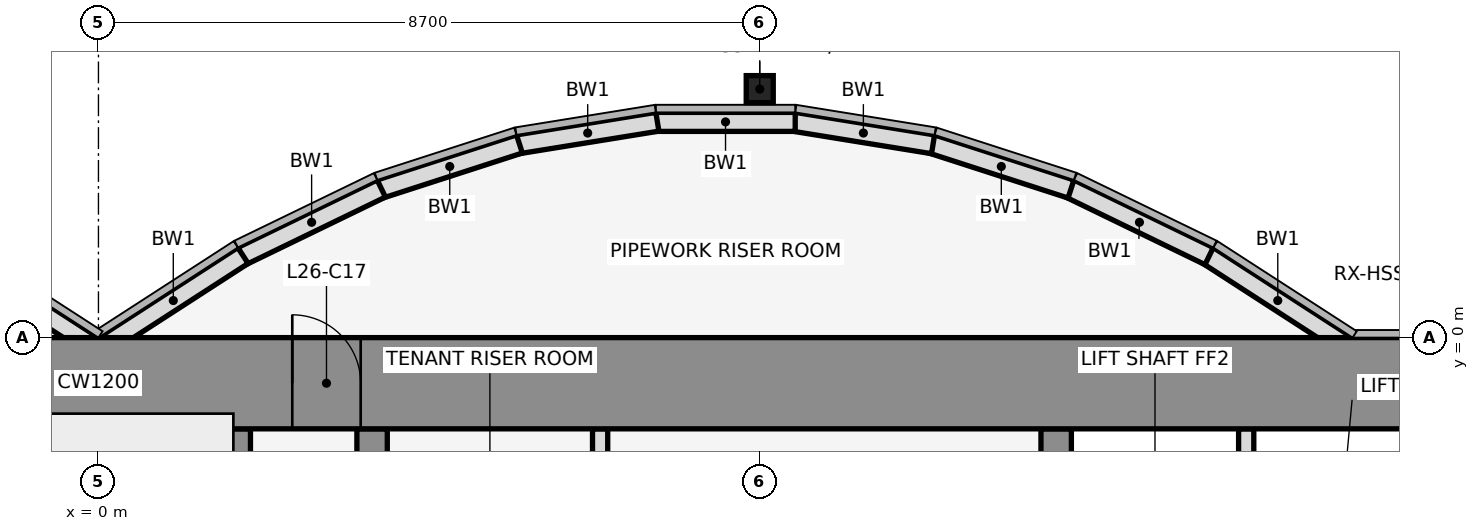
"""IFC4 building model, lengths in metres.
Left out: names, types, materials, properties, quantities, classifications, styles, units other than length and angle.
Written with IfcOpenShell. Run it as: python <this file> out.ifc"""

import sys

from ifc_helpers import new_model, si_unit, direction, frame, frame_2d, origin, origin_2d, place, context, subcontext, project, spatial, rectangle, hollow_rectangle, extrude, element, fill, save


model = new_model("IFC4")
c1 = context("Model", 3, precision=1e-05, world=origin(), true_north=direction((0.0, 1.0)))
c2 = subcontext(c1, "Body", "Model", "MODEL_VIEW")
j1 = project(units=[si_unit("LENGTHUNIT", "METRE"), si_unit("PLANEANGLEUNIT", "RADIAN")], contexts=[c1])
p1 = place(None, origin())
s1 = spatial("IfcSite", under=j1, at=p1, CompositionType="ELEMENT")
p2 = place(p1, origin())
s2 = spatial("IfcBuilding", under=s1, at=p2, CompositionType="ELEMENT")
p3 = place(p2, frame((0.0, 0.0, 122.7)))
s3 = spatial("IfcBuildingStorey", under=s2, at=p3, CompositionType="ELEMENT", Elevation=122.7)
p4 = place(p3, frame((8.7, 3.269, 0.0), z_axis=(0.0, 0.0, 1.0), x_axis=(1.0, 0.0, 0.0)))
e1 = element("IfcColumn", 1, at=p4, inside=s3, PredefinedType="COLUMN", context=c2, shape_type="SweptSolid", body=[
    extrude(hollow_rectangle(XDim=0.356, YDim=0.356, WallThickness=0.012, at=origin_2d()), origin(), (0.0, 0.0, 1.0), 4.1),
])
p5 = place(p3, frame((16.432, -0.105, 0.0), z_axis=(0.0, 0.0, 1.0), x_axis=(-0.83981312244, 0.542875602121, 0.0)))
e2 = element("IfcWall", 2, at=p5, inside=s3, PredefinedType="STANDARD", context=c2, shape_type="SweptSolid", body=[
    extrude(rectangle(XDim=2.183, YDim=0.25, at=frame_2d((1.091, 0.0))), origin(), (0.0, 0.0, 1.0), 3.95),
])
p6 = place(p3, frame((14.612, 1.073, 0.0), z_axis=(0.0, 0.0, 1.0), x_axis=(-0.89982408427, 0.436252928206, 0.0)))
e3 = element("IfcWall", 3, at=p6, inside=s3, PredefinedType="STANDARD", context=c2, shape_type="SweptSolid", body=[
    extrude(rectangle(XDim=2.038, YDim=0.25, at=frame_2d((1.019, 0.0))), origin(), (0.0, 0.0, 1.0), 3.95),
])
p7 = place(p3, frame((12.795, 1.955, 0.0), z_axis=(0.0, 0.0, 1.0), x_axis=(-0.951495806175, 0.307661714928, 0.0)))
e4 = element("IfcWall", 4, at=p7, inside=s3, PredefinedType="STANDARD", context=c2, shape_type="SweptSolid", body=[
    extrude(rectangle(XDim=1.927, YDim=0.25, at=frame_2d((0.963, 0.0))), origin(), (0.0, 0.0, 1.0), 3.95),
])
p8 = place(p3, frame((10.98, 2.543, 0.0), z_axis=(0.0, 0.0, 1.0), x_axis=(-0.987181718931, 0.159600293885, 0.0)))
e5 = element("IfcWall", 5, at=p8, inside=s3, PredefinedType="STANDARD", context=c2, shape_type="SweptSolid", body=[
    extrude(rectangle(XDim=1.857, YDim=0.25, at=frame_2d((0.929, 0.0))), origin(), (0.0, 0.0, 1.0), 3.95),
])
p9 = place(p3, frame((9.167, 2.838, 0.0), z_axis=(0.0, 0.0, 1.0), x_axis=(-1.0, 0.0, 0.0)))
e6 = element("IfcWall", 6, at=p9, inside=s3, PredefinedType="STANDARD", context=c2, shape_type="SweptSolid", body=[
    extrude(rectangle(XDim=1.833, YDim=0.25, at=frame_2d((0.917, 0.0))), origin(), (0.0, 0.0, 1.0), 3.95),
])
p10 = place(p3, frame((7.353, 2.84, 0.0), z_axis=(0.0, 0.0, 1.0), x_axis=(-0.987181718931, -0.159600293885, 0.0)))
e7 = element("IfcWall", 7, at=p10, inside=s3, PredefinedType="STANDARD", context=c2, shape_type="SweptSolid", body=[
    extrude(rectangle(XDim=1.857, YDim=0.25, at=frame_2d((0.929, 0.0))), origin(), (0.0, 0.0, 1.0), 3.95),
])
p11 = place(p3, frame((5.538, 2.548, 0.0), z_axis=(0.0, 0.0, 1.0), x_axis=(-0.951495806175, -0.307661714928, 0.0)))
e8 = element("IfcWall", 8, at=p11, inside=s3, PredefinedType="STANDARD", context=c2, shape_type="SweptSolid", body=[
    extrude(rectangle(XDim=1.927, YDim=0.25, at=frame_2d((0.963, 0.0))), origin(), (0.0, 0.0, 1.0), 3.95),
])
p12 = place(p3, frame((3.721, 1.962, 0.0), z_axis=(0.0, 0.0, 1.0), x_axis=(-0.89982408427, -0.436252928206, 0.0)))
e9 = element("IfcWall", 9, at=p12, inside=s3, PredefinedType="STANDARD", context=c2, shape_type="SweptSolid", body=[
    extrude(rectangle(XDim=2.038, YDim=0.25, at=frame_2d((1.019, 0.0))), origin(), (0.0, 0.0, 1.0), 3.95),
])
for number, where, z_axis, x_axis in (
    (10, (1.901, 1.08, 0.0), (0.0, 0.0, 1.0), (-0.84, -0.543, 0.0)),
    (11, (-0.068, -0.105, 0.0), (0.0, 0.0, 1.0), (-0.84, 0.543, 0.0)),
):
    element("IfcWall", number, at=place(p3, frame(where, z_axis=z_axis, x_axis=x_axis)), inside=s3, PredefinedType="STANDARD", context=c2, shape_type="SweptSolid", body=[
        extrude(rectangle(XDim=2.183, YDim=0.25, at=frame_2d((1.091, 0.0))), origin(), (0.0, 0.0, 1.0), 3.95),
    ])
p13 = place(p3, frame((1.8, -11.8, 0.0), z_axis=(0.0, 0.0, 1.0), x_axis=(0.0, 1.0, 0.0)))
e12 = element("IfcWall", 12, at=p13, inside=s3, PredefinedType="SHEAR", context=c2, shape_type="SweptSolid", body=[
    extrude(rectangle(XDim=10.6, YDim=0.4, at=frame_2d((5.3, 0.0))), origin(), (0.0, 0.0, 1.0), 4.1),
])
p14 = place(p3, frame((3.6, -11.8, 0.0), z_axis=(0.0, 0.0, 1.0), x_axis=(0.0, 1.0, 0.0)))
e13 = element("IfcWall", 13, at=p14, inside=s3, PredefinedType="SHEAR", context=c2, shape_type="SweptSolid", body=[
    extrude(rectangle(XDim=10.6, YDim=0.4, at=frame_2d((5.3, 0.0))), origin(), (0.0, 0.0, 1.0), 4.1),
])
p15 = place(p14, frame((1.35, 0.0, 0.0)))
e14 = element("IfcOpeningElement", 14, at=p15, cuts=e13, PredefinedType="OPENING", context=c2, shape_type="SweptSolid", body=[
    extrude(rectangle(XDim=0.9, YDim=2.1, at=frame_2d((0.45, 1.05))), frame((0.0, 0.212, 0.0), z_axis=(0.0, -1.0, 0.0), x_axis=(1.0, 0.0, 0.0)), (0.0, 0.0, 1.0), 0.424),
])
p16 = place(p3, frame((6.6, -4.6, 0.0), z_axis=(0.0, 0.0, 1.0), x_axis=(0.0, 1.0, 0.0)))
e15 = element("IfcWall", 15, at=p16, inside=s3, PredefinedType="PARTITIONING", context=c2, shape_type="SweptSolid", body=[
    extrude(rectangle(XDim=3.4, YDim=0.2, at=frame_2d((1.7, 0.0))), origin(), (0.0, 0.0, 1.0), 3.018),
])
p17 = place(p3, frame((12.6, -11.8, 0.0), z_axis=(0.0, 0.0, 1.0), x_axis=(0.0, 1.0, 0.0)))
e16 = element("IfcWall", 16, at=p17, inside=s3, PredefinedType="SHEAR", context=c2, shape_type="SweptSolid", body=[
    extrude(rectangle(XDim=10.6, YDim=0.4, at=frame_2d((5.3, 0.0))), origin(), (0.0, 0.0, 1.0), 4.1),
])
p18 = place(p17, frame((4.75, 0.0, 0.0)))
e17 = element("IfcOpeningElement", 17, at=p18, cuts=e16, PredefinedType="OPENING", context=c2, shape_type="SweptSolid", body=[
    extrude(rectangle(XDim=1.1, YDim=2.1, at=frame_2d((0.55, 1.05))), frame((0.0, 0.212, 0.0), z_axis=(0.0, -1.0, 0.0), x_axis=(1.0, 0.0, 0.0)), (0.0, 0.0, 1.0), 0.424),
])
p19 = place(p3, frame((15.1, -4.6, 0.0), z_axis=(0.0, 0.0, 1.0), x_axis=(0.0, 1.0, 0.0)))
e18 = element("IfcWall", 18, at=p19, inside=s3, PredefinedType="PARTITIONING", context=c2, shape_type="SweptSolid", body=[
    extrude(rectangle(XDim=3.4, YDim=0.2, at=frame_2d((1.7, 0.0))), origin(), (0.0, 0.0, 1.0), 3.018),
])
p20 = place(p3, frame((-22.0, -0.6, 0.0), z_axis=(0.0, 0.0, 1.0), x_axis=(1.0, 0.0, 0.0)))
e19 = element("IfcWall", 19, at=p20, inside=s3, PredefinedType="SHEAR", context=c2, shape_type="SweptSolid", body=[
    extrude(rectangle(XDim=44.0, YDim=1.2, at=frame_2d((22.0, 0.0))), origin(), (0.0, 0.0, 1.0), 4.1),
])
p21 = place(p20, frame((18.55, 0.0, 0.0)))
e20 = element("IfcOpeningElement", 20, at=p21, cuts=e19, PredefinedType="OPENING", context=c2, shape_type="SweptSolid", body=[
    extrude(rectangle(XDim=0.9, YDim=2.1, at=frame_2d((0.45, 1.05))), frame((0.0, 0.612, 0.0), z_axis=(0.0, -1.0, 0.0), x_axis=(1.0, 0.0, 0.0)), (0.0, 0.0, 1.0), 1.224),
])
p22 = place(p20, frame((24.55, 0.0, 0.0)))
e21 = element("IfcOpeningElement", 21, at=p22, cuts=e19, PredefinedType="OPENING", context=c2, shape_type="SweptSolid", body=[
    extrude(rectangle(XDim=0.9, YDim=2.1, at=frame_2d((0.45, 1.05))), frame((0.0, 0.612, 0.0), z_axis=(0.0, -1.0, 0.0), x_axis=(1.0, 0.0, 0.0)), (0.0, 0.0, 1.0), 1.224),
])
p23 = place(p22, origin())
e22 = element("IfcDoor", 22, at=p23, inside=s3, OperationType="SINGLE_SWING_LEFT", PredefinedType="DOOR", context=c2, shape_type="SweptSolid", body=[
    extrude(rectangle(XDim=0.9, YDim=2.1, at=frame_2d((0.45, 1.05))), frame((0.0, 0.025, 0.0), z_axis=(0.0, -1.0, 0.0), x_axis=(1.0, 0.0, 0.0)), (0.0, 0.0, 1.0), 0.05),
])
fill(e21, e22)
save(model, sys.argv[1])
